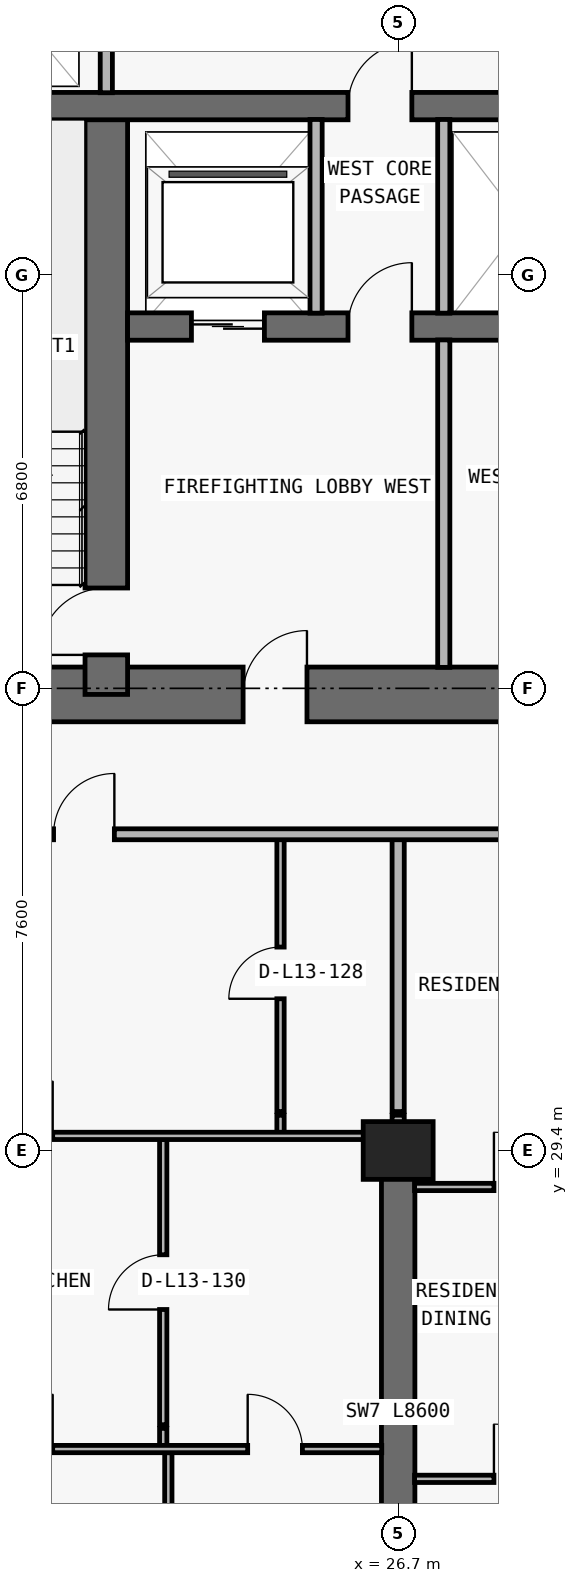
"""IFC4 building model, lengths in metres.
Left out: names, types, materials, properties, quantities, classifications, styles, units other than length and angle.
Written with IfcOpenShell. Run it as: python <this file> out.ifc"""

import sys

from ifc_helpers import new_model, si_unit, direction, frame, frame_2d, origin, origin_2d, place, context, subcontext, project, spatial, rectangle, extrude, element, fill, save


model = new_model("IFC4")
c1 = context("Model", 3, precision=1e-05, world=origin(), true_north=direction((0.0, 1.0)))
c2 = subcontext(c1, "Body", "Model", "MODEL_VIEW")
j1 = project(units=[si_unit("LENGTHUNIT", "METRE"), si_unit("PLANEANGLEUNIT", "RADIAN")], contexts=[c1])
p1 = place(None, origin())
s1 = spatial("IfcSite", under=j1, at=p1, CompositionType="ELEMENT")
p2 = place(p1, origin())
s2 = spatial("IfcBuilding", under=s1, at=p2, CompositionType="ELEMENT")
p3 = place(p2, frame((0.0, 0.0, 53.1)))
s3 = spatial("IfcBuildingStorey", under=s2, at=p3, CompositionType="ELEMENT", Elevation=53.1)
p4 = place(p3, frame((26.7, 29.4, 0.0), z_axis=(0.0, 0.0, 1.0), x_axis=(1.0, 0.0, 0.0)))
e1 = element("IfcColumn", 1, at=p4, inside=s3, PredefinedType="COLUMN", context=c2, shape_type="SweptSolid", body=[
    extrude(rectangle(XDim=1.15, YDim=0.95, at=origin_2d()), origin(), (0.0, 0.0, 1.0), 3.05),
])
p5 = place(p3, frame((17.75, 36.9, 0.0), z_axis=(0.0, 0.0, 1.0), x_axis=(1.0, 0.0, 0.0)))
e2 = element("IfcWall", 2, at=p5, inside=s3, PredefinedType="SHEAR", context=c2, shape_type="SweptSolid", body=[
    extrude(rectangle(XDim=42.3, YDim=0.9, at=frame_2d((21.15, 0.0))), origin(), (0.0, 0.0, 1.0), 3.05),
])
p6 = place(p5, frame((14.55, 0.0, 0.0)))
e3 = element("IfcOpeningElement", 3, at=p6, cuts=e2, PredefinedType="OPENING", context=c2, shape_type="SweptSolid", body=[
    extrude(rectangle(XDim=1.1, YDim=2.15, at=frame_2d((0.55, 1.075))), frame((0.0, 0.46, 0.0), z_axis=(0.0, -1.0, 0.0), x_axis=(1.0, 0.0, 0.0)), (0.0, 0.0, 1.0), 0.92),
])
p7 = place(p5, frame((6.4, 0.0, 0.0)))
e4 = element("IfcOpeningElement", 4, at=p7, cuts=e2, PredefinedType="OPENING", context=c2, shape_type="SweptSolid", body=[
    extrude(rectangle(XDim=1.05, YDim=2.15, at=frame_2d((0.525, 1.075))), frame((0.0, 0.46, 0.0), z_axis=(0.0, -1.0, 0.0), x_axis=(1.0, 0.0, 0.0)), (0.0, 0.0, 1.0), 0.92),
])
p8 = place(p5, frame((34.9, 0.0, 0.0)))
e5 = element("IfcOpeningElement", 5, at=p8, cuts=e2, PredefinedType="OPENING", context=c2, shape_type="SweptSolid", body=[
    extrude(rectangle(XDim=1.05, YDim=2.15, at=frame_2d((0.525, 1.075))), frame((0.0, 0.46, 0.0), z_axis=(0.0, -1.0, 0.0), x_axis=(1.0, 0.0, 0.0)), (0.0, 0.0, 1.0), 0.92),
])
p9 = place(p5, frame((11.012, 0.0, 0.0)))
e6 = element("IfcOpeningElement", 6, at=p9, cuts=e2, PredefinedType="OPENING", context=c2, shape_type="SweptSolid", body=[
    extrude(rectangle(XDim=1.05, YDim=2.15, at=frame_2d((0.525, 1.075))), frame((0.0, 0.46, 0.0), z_axis=(0.0, -1.0, 0.0), x_axis=(1.0, 0.0, 0.0)), (0.0, 0.0, 1.0), 0.92),
])
p10 = place(p5, frame((24.25, 0.0, 0.0)))
e7 = element("IfcOpeningElement", 7, at=p10, cuts=e2, PredefinedType="OPENING", context=c2, shape_type="SweptSolid", body=[
    extrude(rectangle(XDim=1.05, YDim=2.15, at=frame_2d((0.525, 1.075))), frame((0.0, 0.46, 0.0), z_axis=(0.0, -1.0, 0.0), x_axis=(1.0, 0.0, 0.0)), (0.0, 0.0, 1.0), 0.92),
])
p11 = place(p3, frame((21.9, 36.9, 0.0), z_axis=(0.0, 0.0, 1.0), x_axis=(0.0, 1.0, 0.0)))
e8 = element("IfcWall", 8, at=p11, inside=s3, PredefinedType="SHEAR", context=c2, shape_type="SweptSolid", body=[
    extrude(rectangle(XDim=9.675, YDim=0.7, at=frame_2d((4.837, 0.0))), origin(), (0.0, 0.0, 1.0), 3.05),
])
p12 = place(p11, frame((0.65, 0.0, 0.0)))
e9 = element("IfcOpeningElement", 9, at=p12, cuts=e8, PredefinedType="OPENING", context=c2, shape_type="SweptSolid", body=[
    extrude(rectangle(XDim=1.1, YDim=2.15, at=frame_2d((0.55, 1.075))), frame((0.0, 0.36, 0.0), z_axis=(0.0, -1.0, 0.0), x_axis=(1.0, 0.0, 0.0)), (0.0, 0.0, 1.0), 0.72),
])
p13 = place(p3, frame((22.25, 42.95, 0.0), z_axis=(0.0, 0.0, 1.0), x_axis=(1.0, 0.0, 0.0)))
e10 = element("IfcWall", 10, at=p13, inside=s3, PredefinedType="SHEAR", context=c2, shape_type="SweptSolid", body=[
    extrude(rectangle(XDim=33.3, YDim=0.45, at=frame_2d((16.65, 0.0))), origin(), (0.0, 0.0, 1.0), 3.05),
])
p14 = place(p13, frame((1.05, 0.0, 0.0)))
e11 = element("IfcOpeningElement", 11, at=p14, cuts=e10, PredefinedType="OPENING", context=c2, shape_type="SweptSolid", body=[
    extrude(rectangle(XDim=1.2, YDim=2.2, at=frame_2d((0.6, 1.1))), frame((0.0, 0.235, 0.0), z_axis=(0.0, -1.0, 0.0), x_axis=(1.0, 0.0, 0.0)), (0.0, 0.0, 1.0), 0.47),
])
p15 = place(p13, frame((31.05, 0.0, 0.0)))
e12 = element("IfcOpeningElement", 12, at=p15, cuts=e10, PredefinedType="OPENING", context=c2, shape_type="SweptSolid", body=[
    extrude(rectangle(XDim=1.2, YDim=2.2, at=frame_2d((0.6, 1.1))), frame((0.0, 0.235, 0.0), z_axis=(0.0, -1.0, 0.0), x_axis=(1.0, 0.0, 0.0)), (0.0, 0.0, 1.0), 0.47),
])
p16 = place(p13, frame((13.5, 0.0, 0.0)))
e13 = element("IfcOpeningElement", 13, at=p16, cuts=e10, PredefinedType="OPENING", context=c2, shape_type="SweptSolid", body=[
    extrude(rectangle(XDim=1.1, YDim=2.2, at=frame_2d((0.55, 1.1))), frame((0.0, 0.235, 0.0), z_axis=(0.0, -1.0, 0.0), x_axis=(1.0, 0.0, 0.0)), (0.0, 0.0, 1.0), 0.47),
])
p17 = place(p13, frame((16.1, 0.0, 0.0)))
e14 = element("IfcOpeningElement", 14, at=p17, cuts=e10, PredefinedType="OPENING", context=c2, shape_type="SweptSolid", body=[
    extrude(rectangle(XDim=1.1, YDim=2.2, at=frame_2d((0.55, 1.1))), frame((0.0, 0.235, 0.0), z_axis=(0.0, -1.0, 0.0), x_axis=(1.0, 0.0, 0.0)), (0.0, 0.0, 1.0), 0.47),
])
p18 = place(p13, frame((18.7, 0.0, 0.0)))
e15 = element("IfcOpeningElement", 15, at=p18, cuts=e10, PredefinedType="OPENING", context=c2, shape_type="SweptSolid", body=[
    extrude(rectangle(XDim=1.1, YDim=2.2, at=frame_2d((0.55, 1.1))), frame((0.0, 0.235, 0.0), z_axis=(0.0, -1.0, 0.0), x_axis=(1.0, 0.0, 0.0)), (0.0, 0.0, 1.0), 0.47),
])
p19 = place(p13, frame((3.625, 0.0, 0.0)))
e16 = element("IfcOpeningElement", 16, at=p19, cuts=e10, PredefinedType="OPENING", context=c2, shape_type="SweptSolid", body=[
    extrude(rectangle(XDim=1.05, YDim=2.15, at=frame_2d((0.525, 1.075))), frame((0.0, 0.235, 0.0), z_axis=(0.0, -1.0, 0.0), x_axis=(1.0, 0.0, 0.0)), (0.0, 0.0, 1.0), 0.47),
])
p20 = place(p13, frame((28.675, 0.0, 0.0)))
e17 = element("IfcOpeningElement", 17, at=p20, cuts=e10, PredefinedType="OPENING", context=c2, shape_type="SweptSolid", body=[
    extrude(rectangle(XDim=1.05, YDim=2.15, at=frame_2d((0.525, 1.075))), frame((0.0, 0.235, 0.0), z_axis=(0.0, -1.0, 0.0), x_axis=(1.0, 0.0, 0.0)), (0.0, 0.0, 1.0), 0.47),
])
p21 = place(p3, frame((18.2, 46.575, 0.0), z_axis=(0.0, 0.0, 1.0), x_axis=(1.0, 0.0, 0.0)))
e18 = element("IfcWall", 18, at=p21, inside=s3, PredefinedType="SHEAR", context=c2, shape_type="SweptSolid", body=[
    extrude(rectangle(XDim=41.4, YDim=0.45, at=frame_2d((20.7, 0.0))), origin(), (0.0, 0.0, 1.0), 3.05),
])
p22 = place(p21, frame((7.675, 0.0, 0.0)))
e19 = element("IfcOpeningElement", 19, at=p22, cuts=e18, PredefinedType="OPENING", context=c2, shape_type="SweptSolid", body=[
    extrude(rectangle(XDim=1.05, YDim=2.15, at=frame_2d((0.525, 1.075))), frame((0.0, 0.235, 0.0), z_axis=(0.0, -1.0, 0.0), x_axis=(1.0, 0.0, 0.0)), (0.0, 0.0, 1.0), 0.47),
])
p23 = place(p21, frame((32.725, 0.0, 0.0)))
e20 = element("IfcOpeningElement", 20, at=p23, cuts=e18, PredefinedType="OPENING", context=c2, shape_type="SweptSolid", body=[
    extrude(rectangle(XDim=1.05, YDim=2.15, at=frame_2d((0.525, 1.075))), frame((0.0, 0.235, 0.0), z_axis=(0.0, -1.0, 0.0), x_axis=(1.0, 0.0, 0.0)), (0.0, 0.0, 1.0), 0.47),
])
p24 = place(p3, frame((26.7, 20.8, 0.0), z_axis=(0.0, 0.0, 1.0), x_axis=(0.0, 1.0, 0.0)))
e21 = element("IfcWall", 21, at=p24, inside=s3, PredefinedType="SHEAR", context=c2, shape_type="SweptSolid", body=[
    extrude(rectangle(XDim=8.6, YDim=0.55, at=frame_2d((4.3, 0.0))), origin(), (0.0, 0.0, 1.0), 3.05),
])
p25 = place(p3, frame((21.9, 46.795, 0.0), z_axis=(0.0, 0.0, 1.0), x_axis=(0.0, 1.0, 0.0)))
e22 = element("IfcWall", 22, at=p25, inside=s3, PredefinedType="PARTITIONING", context=c2, shape_type="SweptSolid", body=[
    extrude(rectangle(XDim=3.06, YDim=0.2, at=frame_2d((1.53, 0.0))), origin(), (0.0, 0.0, 1.0), 3.05),
])
p26 = place(p3, frame((22.836, 24.49, 0.0), z_axis=(0.0, 0.0, 1.0), x_axis=(0.0, 1.0, 0.0)))
e23 = element("IfcWall", 23, at=p26, inside=s3, PredefinedType="PARTITIONING", context=c2, shape_type="SweptSolid", body=[
    extrude(rectangle(XDim=0.34, YDim=0.12, at=frame_2d((0.17, 0.0))), origin(), (0.0, 0.0, 1.0), 3.05),
])
p27 = place(p3, frame((22.836, 24.89, 0.0), z_axis=(0.0, 0.0, 1.0), x_axis=(0.0, 1.0, 0.0)))
e24 = element("IfcWall", 24, at=p27, inside=s3, PredefinedType="PARTITIONING", context=c2, shape_type="SweptSolid", body=[
    extrude(rectangle(XDim=4.69, YDim=0.12, at=frame_2d((2.345, 0.0))), origin(), (0.0, 0.0, 1.0), 3.05),
])
p28 = place(p27, frame((1.895, 0.0, 0.0)))
e25 = element("IfcOpeningElement", 25, at=p28, cuts=e24, PredefinedType="OPENING", context=c2, shape_type="SweptSolid", body=[
    extrude(rectangle(XDim=0.9, YDim=2.15, at=frame_2d((0.45, 1.075))), frame((0.0, 0.07, 0.0), z_axis=(0.0, -1.0, 0.0), x_axis=(1.0, 0.0, 0.0)), (0.0, 0.0, 1.0), 0.14),
])
p29 = place(p3, frame((22.92, 6.24, 0.0), z_axis=(0.0, 0.0, 1.0), x_axis=(0.0, 1.0, 0.0)))
e26 = element("IfcWall", 26, at=p29, inside=s3, PredefinedType="PARTITIONING", context=c2, shape_type="SweptSolid", body=[
    extrude(rectangle(XDim=18.19, YDim=0.12, at=frame_2d((9.095, 0.0))), origin(), (0.0, 0.0, 1.0), 3.05),
])
p30 = place(p3, frame((24.765, 29.64, 0.0), z_axis=(0.0, 0.0, 1.0), x_axis=(0.0, 1.0, 0.0)))
e27 = element("IfcWall", 27, at=p30, inside=s3, PredefinedType="PARTITIONING", context=c2, shape_type="SweptSolid", body=[
    extrude(rectangle(XDim=0.34, YDim=0.12, at=frame_2d((0.17, 0.0))), origin(), (0.0, 0.0, 1.0), 3.05),
])
p31 = place(p3, frame((24.765, 30.04, 0.0), z_axis=(0.0, 0.0, 1.0), x_axis=(0.0, 1.0, 0.0)))
e28 = element("IfcWall", 28, at=p31, inside=s3, PredefinedType="PARTITIONING", context=c2, shape_type="SweptSolid", body=[
    extrude(rectangle(XDim=4.56, YDim=0.12, at=frame_2d((2.28, 0.0))), origin(), (0.0, 0.0, 1.0), 3.05),
])
p32 = place(p31, frame((1.855, 0.0, 0.0)))
e29 = element("IfcOpeningElement", 29, at=p32, cuts=e28, PredefinedType="OPENING", context=c2, shape_type="SweptSolid", body=[
    extrude(rectangle(XDim=0.85, YDim=2.1, at=frame_2d((0.425, 1.05))), frame((0.0, 0.07, 0.0), z_axis=(0.0, -1.0, 0.0), x_axis=(1.0, 0.0, 0.0)), (0.0, 0.0, 1.0), 0.14),
])
p33 = place(p3, frame((25.35, 43.17, 0.0), z_axis=(0.0, 0.0, 1.0), x_axis=(0.0, 1.0, 0.0)))
e30 = element("IfcWall", 30, at=p33, inside=s3, PredefinedType="PARTITIONING", context=c2, shape_type="SweptSolid", body=[
    extrude(rectangle(XDim=3.185, YDim=0.2, at=frame_2d((1.593, 0.0))), origin(), (0.0, 0.0, 1.0), 3.05),
])
p34 = place(p3, frame((26.7, 29.64, 0.0), z_axis=(0.0, 0.0, 1.0), x_axis=(0.0, 1.0, 0.0)))
e31 = element("IfcWall", 31, at=p34, inside=s3, PredefinedType="PARTITIONING", context=c2, shape_type="SweptSolid", body=[
    extrude(rectangle(XDim=0.34, YDim=0.2, at=frame_2d((0.17, 0.0))), origin(), (0.0, 0.0, 1.0), 2.335),
])
p35 = place(p3, frame((26.7, 30.04, 0.0), z_axis=(0.0, 0.0, 1.0), x_axis=(0.0, 1.0, 0.0)))
e32 = element("IfcWall", 32, at=p35, inside=s3, PredefinedType="PARTITIONING", context=c2, shape_type="SweptSolid", body=[
    extrude(rectangle(XDim=4.56, YDim=0.2, at=frame_2d((2.28, 0.0))), origin(), (0.0, 0.0, 1.0), 2.335),
])
p36 = place(p3, frame((27.45, 37.345, 0.0), z_axis=(0.0, 0.0, 1.0), x_axis=(0.0, 1.0, 0.0)))
e33 = element("IfcWall", 33, at=p36, inside=s3, PredefinedType="PARTITIONING", context=c2, shape_type="SweptSolid", body=[
    extrude(rectangle(XDim=5.385, YDim=0.2, at=frame_2d((2.692, 0.0))), origin(), (0.0, 0.0, 1.0), 3.05),
])
p37 = place(p3, frame((27.45, 43.17, 0.0), z_axis=(0.0, 0.0, 1.0), x_axis=(0.0, 1.0, 0.0)))
e34 = element("IfcWall", 34, at=p37, inside=s3, PredefinedType="PARTITIONING", context=c2, shape_type="SweptSolid", body=[
    extrude(rectangle(XDim=3.185, YDim=0.2, at=frame_2d((1.593, 0.0))), origin(), (0.0, 0.0, 1.0), 3.05),
])
p38 = place(p3, frame((26.97, 24.0, 0.0), z_axis=(0.0, 0.0, 1.0), x_axis=(1.0, 0.0, 0.0)))
e35 = element("IfcWall", 35, at=p38, inside=s3, PredefinedType="PARTITIONING", context=c2, shape_type="SweptSolid", body=[
    extrude(rectangle(XDim=8.13, YDim=0.12, at=frame_2d((4.065, 0.0))), origin(), (0.0, 0.0, 1.0), 3.05),
])
p39 = place(p38, frame((1.305, 0.0, 0.0)))
e36 = element("IfcOpeningElement", 36, at=p39, cuts=e35, PredefinedType="OPENING", context=c2, shape_type="SweptSolid", body=[
    extrude(rectangle(XDim=0.9, YDim=2.15, at=frame_2d((0.45, 1.075))), frame((0.0, 0.07, 0.0), z_axis=(0.0, -1.0, 0.0), x_axis=(1.0, 0.0, 0.0)), (0.0, 0.0, 1.0), 0.14),
])
p40 = place(p3, frame((18.3, 24.49, 0.0), z_axis=(0.0, 0.0, 1.0), x_axis=(1.0, 0.0, 0.0)))
e37 = element("IfcWall", 37, at=p40, inside=s3, PredefinedType="PARTITIONING", context=c2, shape_type="SweptSolid", body=[
    extrude(rectangle(XDim=8.13, YDim=0.12, at=frame_2d((4.065, 0.0))), origin(), (0.0, 0.0, 1.0), 3.05),
])
p41 = place(p40, frame((1.818, 0.0, 0.0)))
e38 = element("IfcOpeningElement", 38, at=p41, cuts=e37, PredefinedType="OPENING", context=c2, shape_type="SweptSolid", body=[
    extrude(rectangle(XDim=0.9, YDim=2.15, at=frame_2d((0.45, 1.075))), frame((0.0, 0.07, 0.0), z_axis=(0.0, -1.0, 0.0), x_axis=(1.0, 0.0, 0.0)), (0.0, 0.0, 1.0), 0.14),
])
p42 = place(p40, frame((5.925, 0.0, 0.0)))
e39 = element("IfcOpeningElement", 39, at=p42, cuts=e37, PredefinedType="OPENING", context=c2, shape_type="SweptSolid", body=[
    extrude(rectangle(XDim=0.9, YDim=2.15, at=frame_2d((0.45, 1.075))), frame((0.0, 0.07, 0.0), z_axis=(0.0, -1.0, 0.0), x_axis=(1.0, 0.0, 0.0)), (0.0, 0.0, 1.0), 0.14),
])
p43 = place(p3, frame((26.97, 28.8, 0.0), z_axis=(0.0, 0.0, 1.0), x_axis=(1.0, 0.0, 0.0)))
e40 = element("IfcWall", 40, at=p43, inside=s3, PredefinedType="PARTITIONING", context=c2, shape_type="SweptSolid", body=[
    extrude(rectangle(XDim=8.125, YDim=0.12, at=frame_2d((4.062, 0.0))), origin(), (0.0, 0.0, 1.0), 3.05),
])
p44 = place(p43, frame((1.305, 0.0, 0.0)))
e41 = element("IfcOpeningElement", 41, at=p44, cuts=e40, PredefinedType="OPENING", context=c2, shape_type="SweptSolid", body=[
    extrude(rectangle(XDim=0.9, YDim=2.15, at=frame_2d((0.45, 1.075))), frame((0.0, 0.07, 0.0), z_axis=(0.0, -1.0, 0.0), x_axis=(1.0, 0.0, 0.0)), (0.0, 0.0, 1.0), 0.14),
])
p45 = place(p3, frame((18.3, 29.64, 0.0), z_axis=(0.0, 0.0, 1.0), x_axis=(1.0, 0.0, 0.0)))
e42 = element("IfcWall", 42, at=p45, inside=s3, PredefinedType="PARTITIONING", context=c2, shape_type="SweptSolid", body=[
    extrude(rectangle(XDim=8.4, YDim=0.12, at=frame_2d((4.2, 0.0))), origin(), (0.0, 0.0, 1.0), 2.11),
])
p46 = place(p45, frame((1.818, 0.0, 0.0)))
e43 = element("IfcOpeningElement", 43, at=p46, cuts=e42, PredefinedType="OPENING", context=c2, shape_type="SweptSolid", body=[
    extrude(rectangle(XDim=0.9, YDim=2.06, at=frame_2d((0.45, 1.03))), frame((0.0, 0.07, 0.0), z_axis=(0.0, -1.0, 0.0), x_axis=(1.0, 0.0, 0.0)), (0.0, 0.0, 1.0), 0.14),
])
p47 = place(p3, frame((5.105, 34.6, 0.0), z_axis=(0.0, 0.0, 1.0), x_axis=(1.0, 0.0, 0.0)))
e44 = element("IfcWall", 44, at=p47, inside=s3, PredefinedType="PARTITIONING", context=c2, shape_type="SweptSolid", body=[
    extrude(rectangle(XDim=67.595, YDim=0.18, at=frame_2d((33.797, 0.0))), origin(), (0.0, 0.0, 1.0), 3.05),
])
p48 = place(p47, frame((7.365, 0.0, 0.0)))
e45 = element("IfcOpeningElement", 45, at=p48, cuts=e44, PredefinedType="OPENING", context=c2, shape_type="SweptSolid", body=[
    extrude(rectangle(XDim=1.0, YDim=2.2, at=frame_2d((0.5, 1.1))), frame((0.0, 0.1, 0.0), z_axis=(0.0, -1.0, 0.0), x_axis=(1.0, 0.0, 0.0)), (0.0, 0.0, 1.0), 0.2),
])
p49 = place(p47, frame((15.927, 0.0, 0.0)))
e46 = element("IfcOpeningElement", 46, at=p49, cuts=e44, PredefinedType="OPENING", context=c2, shape_type="SweptSolid", body=[
    extrude(rectangle(XDim=1.0, YDim=2.2, at=frame_2d((0.5, 1.1))), frame((0.0, 0.1, 0.0), z_axis=(0.0, -1.0, 0.0), x_axis=(1.0, 0.0, 0.0)), (0.0, 0.0, 1.0), 0.2),
])
p50 = place(p47, frame((24.407, 0.0, 0.0)))
e47 = element("IfcOpeningElement", 47, at=p50, cuts=e44, PredefinedType="OPENING", context=c2, shape_type="SweptSolid", body=[
    extrude(rectangle(XDim=1.0, YDim=2.2, at=frame_2d((0.5, 1.1))), frame((0.0, 0.1, 0.0), z_axis=(0.0, -1.0, 0.0), x_axis=(1.0, 0.0, 0.0)), (0.0, 0.0, 1.0), 0.2),
])
p51 = place(p47, frame((48.739, 0.0, 0.0)))
e48 = element("IfcOpeningElement", 48, at=p51, cuts=e44, PredefinedType="OPENING", context=c2, shape_type="SweptSolid", body=[
    extrude(rectangle(XDim=1.0, YDim=2.2, at=frame_2d((0.5, 1.1))), frame((0.0, 0.1, 0.0), z_axis=(0.0, -1.0, 0.0), x_axis=(1.0, 0.0, 0.0)), (0.0, 0.0, 1.0), 0.2),
])
p52 = place(p47, frame((56.98, 0.0, 0.0)))
e49 = element("IfcOpeningElement", 49, at=p52, cuts=e44, PredefinedType="OPENING", context=c2, shape_type="SweptSolid", body=[
    extrude(rectangle(XDim=1.0, YDim=2.2, at=frame_2d((0.5, 1.1))), frame((0.0, 0.1, 0.0), z_axis=(0.0, -1.0, 0.0), x_axis=(1.0, 0.0, 0.0)), (0.0, 0.0, 1.0), 0.2),
])
p53 = place(p14, origin())
e50 = element("IfcDoor", 50, at=p53, inside=s3, OperationType="DOUBLE_DOOR_SLIDING", PredefinedType="DOOR", context=c2, shape_type="SweptSolid", body=[
    extrude(rectangle(XDim=1.2, YDim=2.2, at=frame_2d((0.6, 1.1))), frame((0.0, 0.025, 0.0), z_axis=(0.0, -1.0, 0.0), x_axis=(1.0, 0.0, 0.0)), (0.0, 0.0, 1.0), 0.05),
])
fill(e11, e50)
p54 = place(p7, origin())
e51 = element("IfcDoor", 51, at=p54, inside=s3, OperationType="SINGLE_SWING_RIGHT", PredefinedType="DOOR", context=c2, shape_type="SweptSolid", body=[
    extrude(rectangle(XDim=1.05, YDim=2.15, at=frame_2d((0.525, 1.075))), frame((0.0, 0.025, 0.0), z_axis=(0.0, -1.0, 0.0), x_axis=(1.0, 0.0, 0.0)), (0.0, 0.0, 1.0), 0.05),
])
fill(e4, e51)
p55 = place(p12, origin())
e52 = element("IfcDoor", 52, at=p55, inside=s3, OperationType="SINGLE_SWING_LEFT", PredefinedType="DOOR", context=c2, shape_type="SweptSolid", body=[
    extrude(rectangle(XDim=1.1, YDim=2.15, at=frame_2d((0.55, 1.075))), frame((0.0, 0.025, 0.0), z_axis=(0.0, -1.0, 0.0), x_axis=(1.0, 0.0, 0.0)), (0.0, 0.0, 1.0), 0.05),
])
fill(e9, e52)
p56 = place(p19, origin())
e53 = element("IfcDoor", 53, at=p56, inside=s3, OperationType="SINGLE_SWING_RIGHT", PredefinedType="DOOR", context=c2, shape_type="SweptSolid", body=[
    extrude(rectangle(XDim=1.05, YDim=2.15, at=frame_2d((0.525, 1.075))), frame((0.0, 0.025, 0.0), z_axis=(0.0, -1.0, 0.0), x_axis=(1.0, 0.0, 0.0)), (0.0, 0.0, 1.0), 0.05),
])
fill(e16, e53)
p57 = place(p22, origin())
e54 = element("IfcDoor", 54, at=p57, inside=s3, OperationType="SINGLE_SWING_RIGHT", PredefinedType="DOOR", context=c2, shape_type="SweptSolid", body=[
    extrude(rectangle(XDim=1.05, YDim=2.15, at=frame_2d((0.525, 1.075))), frame((0.0, 0.025, 0.0), z_axis=(0.0, -1.0, 0.0), x_axis=(1.0, 0.0, 0.0)), (0.0, 0.0, 1.0), 0.05),
])
fill(e19, e54)
p58 = place(p49, origin())
e55 = element("IfcDoor", 55, at=p58, inside=s3, OperationType="SINGLE_SWING_RIGHT", PredefinedType="DOOR", context=c2, shape_type="SweptSolid", body=[
    extrude(rectangle(XDim=1.0, YDim=2.2, at=frame_2d((0.5, 1.1))), frame((0.0, 0.025, 0.0), z_axis=(0.0, -1.0, 0.0), x_axis=(1.0, 0.0, 0.0)), (0.0, 0.0, 1.0), 0.05),
])
fill(e46, e55)
p59 = place(p32, origin())
e56 = element("IfcDoor", 56, at=p59, inside=s3, OperationType="SINGLE_SWING_LEFT", PredefinedType="DOOR", context=c2, shape_type="SweptSolid", body=[
    extrude(rectangle(XDim=0.85, YDim=2.1, at=frame_2d((0.425, 1.05))), frame((0.0, 0.025, 0.0), z_axis=(0.0, -1.0, 0.0), x_axis=(1.0, 0.0, 0.0)), (0.0, 0.0, 1.0), 0.05),
])
fill(e29, e56)
p60 = place(p46, origin())
e57 = element("IfcDoor", 57, at=p60, inside=s3, OperationType="SINGLE_SWING_RIGHT", PredefinedType="DOOR", context=c2, shape_type="SweptSolid", body=[
    extrude(rectangle(XDim=0.9, YDim=2.06, at=frame_2d((0.45, 1.03))), frame((0.0, 0.025, 0.0), z_axis=(0.0, -1.0, 0.0), x_axis=(1.0, 0.0, 0.0)), (0.0, 0.0, 1.0), 0.05),
])
fill(e43, e57)
p61 = place(p28, origin())
e58 = element("IfcDoor", 58, at=p61, inside=s3, OperationType="SINGLE_SWING_LEFT", PredefinedType="DOOR", context=c2, shape_type="SweptSolid", body=[
    extrude(rectangle(XDim=0.9, YDim=2.15, at=frame_2d((0.45, 1.075))), frame((0.0, 0.025, 0.0), z_axis=(0.0, -1.0, 0.0), x_axis=(1.0, 0.0, 0.0)), (0.0, 0.0, 1.0), 0.05),
])
fill(e25, e58)
p62 = place(p41, origin())
e59 = element("IfcDoor", 59, at=p62, inside=s3, OperationType="SINGLE_SWING_RIGHT", PredefinedType="DOOR", context=c2, shape_type="SweptSolid", body=[
    extrude(rectangle(XDim=0.9, YDim=2.15, at=frame_2d((0.45, 1.075))), frame((0.0, 0.025, 0.0), z_axis=(0.0, -1.0, 0.0), x_axis=(1.0, 0.0, 0.0)), (0.0, 0.0, 1.0), 0.05),
])
fill(e38, e59)
p63 = place(p42, origin())
e60 = element("IfcDoor", 60, at=p63, inside=s3, OperationType="SINGLE_SWING_LEFT", PredefinedType="DOOR", context=c2, shape_type="SweptSolid", body=[
    extrude(rectangle(XDim=0.9, YDim=2.15, at=frame_2d((0.45, 1.075))), frame((0.0, 0.025, 0.0), z_axis=(0.0, -1.0, 0.0), x_axis=(1.0, 0.0, 0.0)), (0.0, 0.0, 1.0), 0.05),
])
fill(e39, e60)
p64 = place(p44, origin())
e61 = element("IfcDoor", 61, at=p64, inside=s3, OperationType="SINGLE_SWING_LEFT", PredefinedType="DOOR", context=c2, shape_type="SweptSolid", body=[
    extrude(rectangle(XDim=0.9, YDim=2.15, at=frame_2d((0.45, 1.075))), frame((0.0, 0.025, 0.0), z_axis=(0.0, -1.0, 0.0), x_axis=(1.0, 0.0, 0.0)), (0.0, 0.0, 1.0), 0.05),
])
fill(e41, e61)
p65 = place(p39, origin())
e62 = element("IfcDoor", 62, at=p65, inside=s3, OperationType="SINGLE_SWING_LEFT", PredefinedType="DOOR", context=c2, shape_type="SweptSolid", body=[
    extrude(rectangle(XDim=0.9, YDim=2.15, at=frame_2d((0.45, 1.075))), frame((0.0, 0.025, 0.0), z_axis=(0.0, -1.0, 0.0), x_axis=(1.0, 0.0, 0.0)), (0.0, 0.0, 1.0), 0.05),
])
fill(e36, e62)
save(model, sys.argv[1])
